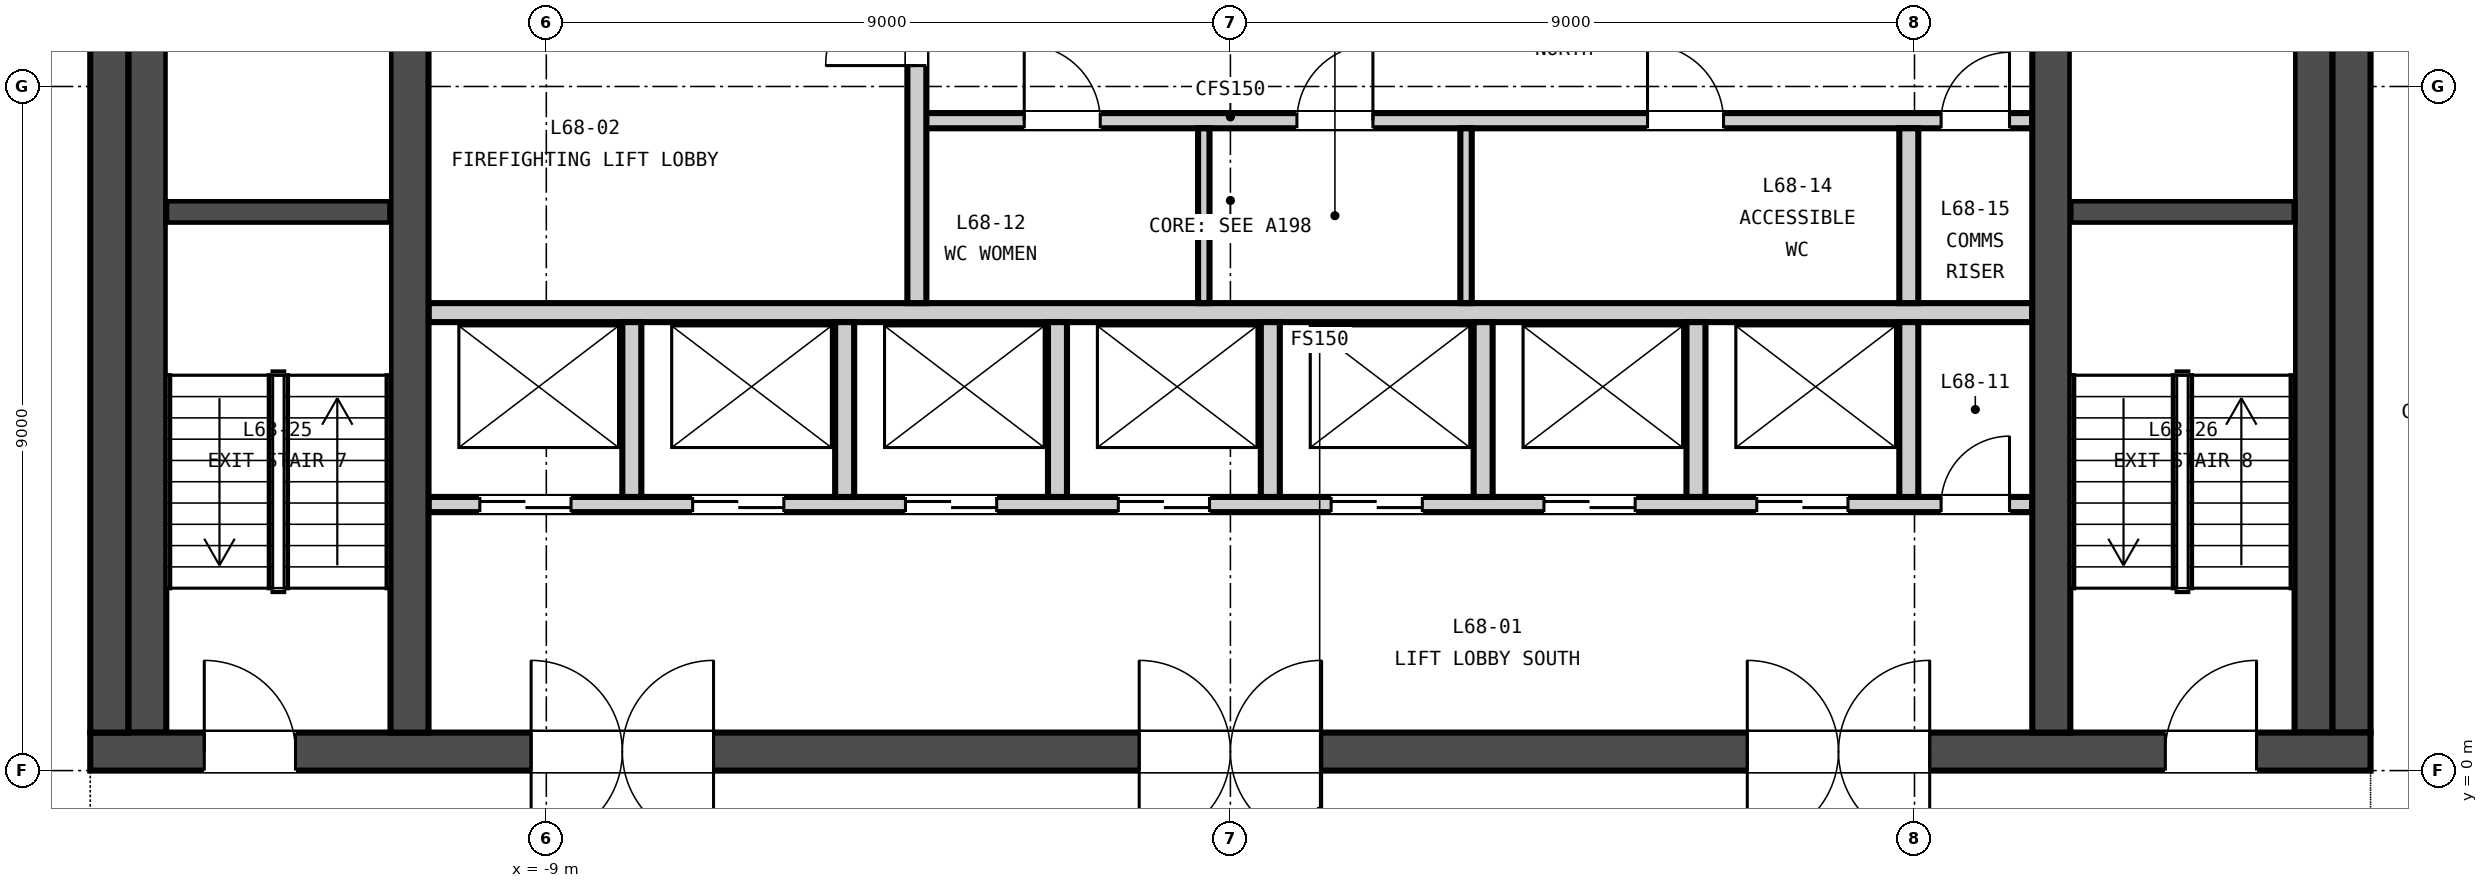
"""IFC4 building model, lengths in metres.
Left out: names, types, materials, properties, quantities, classifications, styles, units other than length and angle.
Written with IfcOpenShell. Run it as: python <this file> out.ifc"""

import sys

from ifc_helpers import new_model, si_unit, direction, frame, frame_2d, origin, place, context, subcontext, project, spatial, rectangle, extrude, element, fill, save


model = new_model("IFC4")
c1 = context("Model", 3, precision=1e-05, world=origin(), true_north=direction((0.0, 1.0)))
c2 = subcontext(c1, "Body", "Model", "MODEL_VIEW")
j1 = project(units=[si_unit("LENGTHUNIT", "METRE"), si_unit("PLANEANGLEUNIT", "RADIAN")], contexts=[c1])
p1 = place(None, origin())
s1 = spatial("IfcSite", under=j1, at=p1, CompositionType="ELEMENT")
p2 = place(p1, origin())
s2 = spatial("IfcBuilding", under=s1, at=p2, CompositionType="ELEMENT")
p3 = place(p2, frame((0.0, 0.0, 268.25)))
s3 = spatial("IfcBuildingStorey", under=s2, at=p3, CompositionType="ELEMENT", Elevation=268.25)
p4 = place(p3, frame((-15.0, 0.25, -0.15), z_axis=(0.0, 0.0, 1.0), x_axis=(1.0, 0.0, 0.0)))
e1 = element("IfcWall", 1, at=p4, inside=s3, PredefinedType="SOLIDWALL", context=c2, shape_type="SweptSolid", body=[
    extrude(rectangle(XDim=30.0, YDim=0.5, at=frame_2d((15.0, 0.0))), origin(), (0.0, 0.0, 1.0), 3.65),
])
p5 = place(p4, frame((5.8, 0.0, 0.15)))
e2 = element("IfcOpeningElement", 2, at=p5, cuts=e1, PredefinedType="OPENING", context=c2, shape_type="SweptSolid", body=[
    extrude(rectangle(XDim=2.4, YDim=2.4, at=frame_2d((1.2, 1.2))), frame((0.0, 0.26, 0.0), z_axis=(0.0, -1.0, 0.0), x_axis=(1.0, 0.0, 0.0)), (0.0, 0.0, 1.0), 0.52),
])
p6 = place(p4, frame((13.8, 0.0, 0.15)))
e3 = element("IfcOpeningElement", 3, at=p6, cuts=e1, PredefinedType="OPENING", context=c2, shape_type="SweptSolid", body=[
    extrude(rectangle(XDim=2.4, YDim=2.4, at=frame_2d((1.2, 1.2))), frame((0.0, 0.26, 0.0), z_axis=(0.0, -1.0, 0.0), x_axis=(1.0, 0.0, 0.0)), (0.0, 0.0, 1.0), 0.52),
])
p7 = place(p4, frame((21.8, 0.0, 0.15)))
e4 = element("IfcOpeningElement", 4, at=p7, cuts=e1, PredefinedType="OPENING", context=c2, shape_type="SweptSolid", body=[
    extrude(rectangle(XDim=2.4, YDim=2.4, at=frame_2d((1.2, 1.2))), frame((0.0, 0.26, 0.0), z_axis=(0.0, -1.0, 0.0), x_axis=(1.0, 0.0, 0.0)), (0.0, 0.0, 1.0), 0.52),
])
p8 = place(p4, frame((1.5, 0.0, 0.15)))
e5 = element("IfcOpeningElement", 5, at=p8, cuts=e1, PredefinedType="OPENING", context=c2, shape_type="SweptSolid", body=[
    extrude(rectangle(XDim=1.2, YDim=2.1, at=frame_2d((0.6, 1.05))), frame((0.0, 0.26, 0.0), z_axis=(0.0, -1.0, 0.0), x_axis=(1.0, 0.0, 0.0)), (0.0, 0.0, 1.0), 0.52),
])
p9 = place(p4, frame((27.3, 0.0, 0.15)))
e6 = element("IfcOpeningElement", 6, at=p9, cuts=e1, PredefinedType="OPENING", context=c2, shape_type="SweptSolid", body=[
    extrude(rectangle(XDim=1.2, YDim=2.1, at=frame_2d((0.6, 1.05))), frame((0.0, 0.26, 0.0), z_axis=(0.0, -1.0, 0.0), x_axis=(1.0, 0.0, 0.0)), (0.0, 0.0, 1.0), 0.52),
])
for number, where, z_axis, x_axis in (
    (7, (-14.75, 0.5, -0.15), (0.0, 0.0, 1.0), (0.0, 1.0, 0.0)),
    (8, (14.75, 0.5, -0.15), (0.0, 0.0, 1.0), (0.0, 1.0, 0.0)),
    (9, (-10.8, 0.5, -0.15), (0.0, 0.0, 1.0), (0.0, 1.0, 0.0)),
    (10, (10.8, 0.5, -0.15), (0.0, 0.0, 1.0), (0.0, 1.0, 0.0)),
):
    element("IfcWall", number, at=place(p3, frame(where, z_axis=z_axis, x_axis=x_axis)), inside=s3, PredefinedType="SOLIDWALL", context=c2, shape_type="SweptSolid", body=[
        extrude(rectangle(XDim=14.0, YDim=0.5, at=frame_2d((7.0, 0.0))), origin(), (0.0, 0.0, 1.0), 3.65),
    ])
p10 = place(p3, frame((-10.55, 3.5, 0.0), z_axis=(0.0, 0.0, 1.0), x_axis=(1.0, 0.0, 0.0)))
e11 = element("IfcWall", 11, at=p10, inside=s3, PredefinedType="PARTITIONING", context=c2, shape_type="SweptSolid", body=[
    extrude(rectangle(XDim=21.1, YDim=0.2, at=frame_2d((10.55, 0.0))), origin(), (0.0, 0.0, 1.0), 3.5),
])
p11 = place(p10, frame((0.675, 0.0, 0.0)))
e12 = element("IfcOpeningElement", 12, at=p11, cuts=e11, PredefinedType="OPENING", context=c2, shape_type="SweptSolid", body=[
    extrude(rectangle(XDim=1.2, YDim=2.1, at=frame_2d((0.6, 1.05))), frame((0.0, 0.11, 0.0), z_axis=(0.0, -1.0, 0.0), x_axis=(1.0, 0.0, 0.0)), (0.0, 0.0, 1.0), 0.22),
])
p12 = place(p10, frame((3.475, 0.0, 0.0)))
e13 = element("IfcOpeningElement", 13, at=p12, cuts=e11, PredefinedType="OPENING", context=c2, shape_type="SweptSolid", body=[
    extrude(rectangle(XDim=1.2, YDim=2.1, at=frame_2d((0.6, 1.05))), frame((0.0, 0.11, 0.0), z_axis=(0.0, -1.0, 0.0), x_axis=(1.0, 0.0, 0.0)), (0.0, 0.0, 1.0), 0.22),
])
p13 = place(p10, frame((6.275, 0.0, 0.0)))
e14 = element("IfcOpeningElement", 14, at=p13, cuts=e11, PredefinedType="OPENING", context=c2, shape_type="SweptSolid", body=[
    extrude(rectangle(XDim=1.2, YDim=2.1, at=frame_2d((0.6, 1.05))), frame((0.0, 0.11, 0.0), z_axis=(0.0, -1.0, 0.0), x_axis=(1.0, 0.0, 0.0)), (0.0, 0.0, 1.0), 0.22),
])
p14 = place(p10, frame((9.075, 0.0, 0.0)))
e15 = element("IfcOpeningElement", 15, at=p14, cuts=e11, PredefinedType="OPENING", context=c2, shape_type="SweptSolid", body=[
    extrude(rectangle(XDim=1.2, YDim=2.1, at=frame_2d((0.6, 1.05))), frame((0.0, 0.11, 0.0), z_axis=(0.0, -1.0, 0.0), x_axis=(1.0, 0.0, 0.0)), (0.0, 0.0, 1.0), 0.22),
])
p15 = place(p10, frame((11.875, 0.0, 0.0)))
e16 = element("IfcOpeningElement", 16, at=p15, cuts=e11, PredefinedType="OPENING", context=c2, shape_type="SweptSolid", body=[
    extrude(rectangle(XDim=1.2, YDim=2.1, at=frame_2d((0.6, 1.05))), frame((0.0, 0.11, 0.0), z_axis=(0.0, -1.0, 0.0), x_axis=(1.0, 0.0, 0.0)), (0.0, 0.0, 1.0), 0.22),
])
p16 = place(p10, frame((14.675, 0.0, 0.0)))
e17 = element("IfcOpeningElement", 17, at=p16, cuts=e11, PredefinedType="OPENING", context=c2, shape_type="SweptSolid", body=[
    extrude(rectangle(XDim=1.2, YDim=2.1, at=frame_2d((0.6, 1.05))), frame((0.0, 0.11, 0.0), z_axis=(0.0, -1.0, 0.0), x_axis=(1.0, 0.0, 0.0)), (0.0, 0.0, 1.0), 0.22),
])
p17 = place(p10, frame((17.475, 0.0, 0.0)))
e18 = element("IfcOpeningElement", 18, at=p17, cuts=e11, PredefinedType="OPENING", context=c2, shape_type="SweptSolid", body=[
    extrude(rectangle(XDim=1.2, YDim=2.1, at=frame_2d((0.6, 1.05))), frame((0.0, 0.11, 0.0), z_axis=(0.0, -1.0, 0.0), x_axis=(1.0, 0.0, 0.0)), (0.0, 0.0, 1.0), 0.22),
])
p18 = place(p10, frame((19.9, 0.0, 0.0)))
e19 = element("IfcOpeningElement", 19, at=p18, cuts=e11, PredefinedType="OPENING", context=c2, shape_type="SweptSolid", body=[
    extrude(rectangle(XDim=0.9, YDim=2.1, at=frame_2d((0.45, 1.05))), frame((0.0, 0.11, 0.0), z_axis=(0.0, -1.0, 0.0), x_axis=(1.0, 0.0, 0.0)), (0.0, 0.0, 1.0), 0.22),
])
p19 = place(p3, frame((-10.55, 6.025, 0.0), z_axis=(0.0, 0.0, 1.0), x_axis=(1.0, 0.0, 0.0)))
e20 = element("IfcWall", 20, at=p19, inside=s3, PredefinedType="PARTITIONING", context=c2, shape_type="SweptSolid", body=[
    extrude(rectangle(XDim=21.1, YDim=0.25, at=frame_2d((10.55, 0.0))), origin(), (0.0, 0.0, 1.0), 3.5),
])
p20 = place(p3, frame((-4.125, 8.55, 0.0), z_axis=(0.0, 0.0, 1.0), x_axis=(1.0, 0.0, 0.0)))
e21 = element("IfcWall", 21, at=p20, inside=s3, PredefinedType="PARTITIONING", context=c2, shape_type="SweptSolid", body=[
    extrude(rectangle(XDim=14.675, YDim=0.2, at=frame_2d((7.337, 0.0))), origin(), (0.0, 0.0, 1.0), 3.5),
])
p21 = place(p20, frame((1.413, 0.0, 0.0)))
e22 = element("IfcOpeningElement", 22, at=p21, cuts=e21, PredefinedType="OPENING", context=c2, shape_type="SweptSolid", body=[
    extrude(rectangle(XDim=1.0, YDim=2.1, at=frame_2d((0.5, 1.05))), frame((0.0, 0.11, 0.0), z_axis=(0.0, -1.0, 0.0), x_axis=(1.0, 0.0, 0.0)), (0.0, 0.0, 1.0), 0.22),
])
p22 = place(p20, frame((5.0, 0.0, 0.0)))
e23 = element("IfcOpeningElement", 23, at=p22, cuts=e21, PredefinedType="OPENING", context=c2, shape_type="SweptSolid", body=[
    extrude(rectangle(XDim=1.0, YDim=2.1, at=frame_2d((0.5, 1.05))), frame((0.0, 0.11, 0.0), z_axis=(0.0, -1.0, 0.0), x_axis=(1.0, 0.0, 0.0)), (0.0, 0.0, 1.0), 0.22),
])
p23 = place(p20, frame((9.613, 0.0, 0.0)))
e24 = element("IfcOpeningElement", 24, at=p23, cuts=e21, PredefinedType="OPENING", context=c2, shape_type="SweptSolid", body=[
    extrude(rectangle(XDim=1.0, YDim=2.1, at=frame_2d((0.5, 1.05))), frame((0.0, 0.11, 0.0), z_axis=(0.0, -1.0, 0.0), x_axis=(1.0, 0.0, 0.0)), (0.0, 0.0, 1.0), 0.22),
])
p24 = place(p20, frame((13.475, 0.0, 0.0)))
e25 = element("IfcOpeningElement", 25, at=p24, cuts=e21, PredefinedType="OPENING", context=c2, shape_type="SweptSolid", body=[
    extrude(rectangle(XDim=0.9, YDim=2.1, at=frame_2d((0.45, 1.05))), frame((0.0, 0.11, 0.0), z_axis=(0.0, -1.0, 0.0), x_axis=(1.0, 0.0, 0.0)), (0.0, 0.0, 1.0), 0.22),
])
p25 = place(p3, frame((-4.125, 6.15, 0.0), z_axis=(0.0, 0.0, 1.0), x_axis=(0.0, 1.0, 0.0)))
e26 = element("IfcWall", 26, at=p25, inside=s3, PredefinedType="PARTITIONING", context=c2, shape_type="SweptSolid", body=[
    extrude(rectangle(XDim=4.95, YDim=0.25, at=frame_2d((2.475, 0.0))), origin(), (0.0, 0.0, 1.0), 3.5),
])
p26 = place(p25, frame((3.125, 0.0, 0.0)))
e27 = element("IfcOpeningElement", 27, at=p26, cuts=e26, PredefinedType="OPENING", context=c2, shape_type="SweptSolid", body=[
    extrude(rectangle(XDim=1.2, YDim=2.1, at=frame_2d((0.6, 1.05))), frame((0.0, 0.135, 0.0), z_axis=(0.0, -1.0, 0.0), x_axis=(1.0, 0.0, 0.0)), (0.0, 0.0, 1.0), 0.27),
])
for number, where, z_axis, x_axis in (
    (28, (-7.875, 3.6, 0.0), (0.0, 0.0, 1.0), (0.0, 1.0, 0.0)),
    (29, (-5.075, 3.6, 0.0), (0.0, 0.0, 1.0), (0.0, 1.0, 0.0)),
    (30, (-2.275, 3.6, 0.0), (0.0, 0.0, 1.0), (0.0, 1.0, 0.0)),
    (31, (0.525, 3.6, 0.0), (0.0, 0.0, 1.0), (0.0, 1.0, 0.0)),
    (32, (3.325, 3.6, 0.0), (0.0, 0.0, 1.0), (0.0, 1.0, 0.0)),
    (33, (6.125, 3.6, 0.0), (0.0, 0.0, 1.0), (0.0, 1.0, 0.0)),
    (34, (8.925, 3.6, 0.0), (0.0, 0.0, 1.0), (0.0, 1.0, 0.0)),
):
    element("IfcWall", number, at=place(p3, frame(where, z_axis=z_axis, x_axis=x_axis)), inside=s3, PredefinedType="PARTITIONING", context=c2, shape_type="SweptSolid", body=[
        extrude(rectangle(XDim=2.3, YDim=0.25, at=frame_2d((1.15, 0.0))), origin(), (0.0, 0.0, 1.0), 3.5),
    ])
for number, where, z_axis, x_axis in (
    (35, (-0.35, 6.15, 0.0), (0.0, 0.0, 1.0), (0.0, 1.0, 0.0)),
    (36, (3.1, 6.15, 0.0), (0.0, 0.0, 1.0), (0.0, 1.0, 0.0)),
):
    element("IfcWall", number, at=place(p3, frame(where, z_axis=z_axis, x_axis=x_axis)), inside=s3, PredefinedType="PARTITIONING", context=c2, shape_type="SweptSolid", body=[
        extrude(rectangle(XDim=2.3, YDim=0.15, at=frame_2d((1.15, 0.0))), origin(), (0.0, 0.0, 1.0), 3.5),
    ])
p27 = place(p3, frame((8.925, 6.15, 0.0), z_axis=(0.0, 0.0, 1.0), x_axis=(0.0, 1.0, 0.0)))
e37 = element("IfcWall", 37, at=p27, inside=s3, PredefinedType="PARTITIONING", context=c2, shape_type="SweptSolid", body=[
    extrude(rectangle(XDim=2.3, YDim=0.25, at=frame_2d((1.15, 0.0))), origin(), (0.0, 0.0, 1.0), 3.5),
])
p28 = place(p3, frame((-14.0, 7.35, 0.0), z_axis=(0.0, 0.0, 1.0), x_axis=(1.0, 0.0, 0.0)))
e38 = element("IfcWall", 38, at=p28, inside=s3, PredefinedType="SOLIDWALL", context=c2, shape_type="SweptSolid", body=[
    extrude(rectangle(XDim=2.95, YDim=0.3, at=frame_2d((1.475, 0.0))), origin(), (0.0, 0.0, 1.0), 3.5),
])
p29 = place(p3, frame((-14.25, 0.5, 0.0), z_axis=(0.0, 0.0, 1.0), x_axis=(0.0, 1.0, 0.0)))
e39 = element("IfcWall", 39, at=p29, inside=s3, PredefinedType="SOLIDWALL", context=c2, shape_type="SweptSolid", body=[
    extrude(rectangle(XDim=14.0, YDim=0.5, at=frame_2d((7.0, 0.0))), origin(), (0.0, 0.0, 1.0), 3.5),
])
p30 = place(p3, frame((11.05, 7.35, 0.0), z_axis=(0.0, 0.0, 1.0), x_axis=(1.0, 0.0, 0.0)))
e40 = element("IfcWall", 40, at=p30, inside=s3, PredefinedType="SOLIDWALL", context=c2, shape_type="SweptSolid", body=[
    extrude(rectangle(XDim=2.95, YDim=0.3, at=frame_2d((1.475, 0.0))), origin(), (0.0, 0.0, 1.0), 3.5),
])
p31 = place(p3, frame((14.25, 0.5, 0.0), z_axis=(0.0, 0.0, 1.0), x_axis=(0.0, 1.0, 0.0)))
e41 = element("IfcWall", 41, at=p31, inside=s3, PredefinedType="SOLIDWALL", context=c2, shape_type="SweptSolid", body=[
    extrude(rectangle(XDim=14.0, YDim=0.5, at=frame_2d((7.0, 0.0))), origin(), (0.0, 0.0, 1.0), 3.5),
])
p32 = place(p26, origin())
e42 = element("IfcDoor", 42, at=p32, inside=s3, OperationType="SINGLE_SWING_LEFT", PredefinedType="DOOR", context=c2, shape_type="SweptSolid", body=[
    extrude(rectangle(XDim=1.2, YDim=2.1, at=frame_2d((0.6, 1.05))), frame((0.0, 0.025, 0.0), z_axis=(0.0, -1.0, 0.0), x_axis=(1.0, 0.0, 0.0)), (0.0, 0.0, 1.0), 0.05),
])
fill(e27, e42)
p33 = place(p11, origin())
e43 = element("IfcDoor", 43, at=p33, inside=s3, OperationType="DOUBLE_DOOR_SLIDING", PredefinedType="DOOR", context=c2, shape_type="SweptSolid", body=[
    extrude(rectangle(XDim=1.2, YDim=2.1, at=frame_2d((0.6, 1.05))), frame((0.0, 0.025, 0.0), z_axis=(0.0, -1.0, 0.0), x_axis=(1.0, 0.0, 0.0)), (0.0, 0.0, 1.0), 0.05),
])
fill(e12, e43)
p34 = place(p12, origin())
e44 = element("IfcDoor", 44, at=p34, inside=s3, OperationType="DOUBLE_DOOR_SLIDING", PredefinedType="DOOR", context=c2, shape_type="SweptSolid", body=[
    extrude(rectangle(XDim=1.2, YDim=2.1, at=frame_2d((0.6, 1.05))), frame((0.0, 0.025, 0.0), z_axis=(0.0, -1.0, 0.0), x_axis=(1.0, 0.0, 0.0)), (0.0, 0.0, 1.0), 0.05),
])
fill(e13, e44)
p35 = place(p13, origin())
e45 = element("IfcDoor", 45, at=p35, inside=s3, OperationType="DOUBLE_DOOR_SLIDING", PredefinedType="DOOR", context=c2, shape_type="SweptSolid", body=[
    extrude(rectangle(XDim=1.2, YDim=2.1, at=frame_2d((0.6, 1.05))), frame((0.0, 0.025, 0.0), z_axis=(0.0, -1.0, 0.0), x_axis=(1.0, 0.0, 0.0)), (0.0, 0.0, 1.0), 0.05),
])
fill(e14, e45)
p36 = place(p14, origin())
e46 = element("IfcDoor", 46, at=p36, inside=s3, OperationType="DOUBLE_DOOR_SLIDING", PredefinedType="DOOR", context=c2, shape_type="SweptSolid", body=[
    extrude(rectangle(XDim=1.2, YDim=2.1, at=frame_2d((0.6, 1.05))), frame((0.0, 0.025, 0.0), z_axis=(0.0, -1.0, 0.0), x_axis=(1.0, 0.0, 0.0)), (0.0, 0.0, 1.0), 0.05),
])
fill(e15, e46)
p37 = place(p15, origin())
e47 = element("IfcDoor", 47, at=p37, inside=s3, OperationType="DOUBLE_DOOR_SLIDING", PredefinedType="DOOR", context=c2, shape_type="SweptSolid", body=[
    extrude(rectangle(XDim=1.2, YDim=2.1, at=frame_2d((0.6, 1.05))), frame((0.0, 0.025, 0.0), z_axis=(0.0, -1.0, 0.0), x_axis=(1.0, 0.0, 0.0)), (0.0, 0.0, 1.0), 0.05),
])
fill(e16, e47)
p38 = place(p16, origin())
e48 = element("IfcDoor", 48, at=p38, inside=s3, OperationType="DOUBLE_DOOR_SLIDING", PredefinedType="DOOR", context=c2, shape_type="SweptSolid", body=[
    extrude(rectangle(XDim=1.2, YDim=2.1, at=frame_2d((0.6, 1.05))), frame((0.0, 0.025, 0.0), z_axis=(0.0, -1.0, 0.0), x_axis=(1.0, 0.0, 0.0)), (0.0, 0.0, 1.0), 0.05),
])
fill(e17, e48)
p39 = place(p17, origin())
e49 = element("IfcDoor", 49, at=p39, inside=s3, OperationType="DOUBLE_DOOR_SLIDING", PredefinedType="DOOR", context=c2, shape_type="SweptSolid", body=[
    extrude(rectangle(XDim=1.2, YDim=2.1, at=frame_2d((0.6, 1.05))), frame((0.0, 0.025, 0.0), z_axis=(0.0, -1.0, 0.0), x_axis=(1.0, 0.0, 0.0)), (0.0, 0.0, 1.0), 0.05),
])
fill(e18, e49)
p40 = place(p18, origin())
e50 = element("IfcDoor", 50, at=p40, inside=s3, OperationType="SINGLE_SWING_RIGHT", PredefinedType="DOOR", context=c2, shape_type="SweptSolid", body=[
    extrude(rectangle(XDim=0.9, YDim=2.1, at=frame_2d((0.45, 1.05))), frame((0.0, 0.025, 0.0), z_axis=(0.0, -1.0, 0.0), x_axis=(1.0, 0.0, 0.0)), (0.0, 0.0, 1.0), 0.05),
])
fill(e19, e50)
p41 = place(p21, origin())
e51 = element("IfcDoor", 51, at=p41, inside=s3, OperationType="SINGLE_SWING_LEFT", PredefinedType="DOOR", context=c2, shape_type="SweptSolid", body=[
    extrude(rectangle(XDim=1.0, YDim=2.1, at=frame_2d((0.5, 1.05))), frame((0.0, 0.025, 0.0), z_axis=(0.0, -1.0, 0.0), x_axis=(1.0, 0.0, 0.0)), (0.0, 0.0, 1.0), 0.05),
])
fill(e22, e51)
p42 = place(p22, origin())
e52 = element("IfcDoor", 52, at=p42, inside=s3, OperationType="SINGLE_SWING_RIGHT", PredefinedType="DOOR", context=c2, shape_type="SweptSolid", body=[
    extrude(rectangle(XDim=1.0, YDim=2.1, at=frame_2d((0.5, 1.05))), frame((0.0, 0.025, 0.0), z_axis=(0.0, -1.0, 0.0), x_axis=(1.0, 0.0, 0.0)), (0.0, 0.0, 1.0), 0.05),
])
fill(e23, e52)
p43 = place(p23, origin())
e53 = element("IfcDoor", 53, at=p43, inside=s3, OperationType="SINGLE_SWING_LEFT", PredefinedType="DOOR", context=c2, shape_type="SweptSolid", body=[
    extrude(rectangle(XDim=1.0, YDim=2.1, at=frame_2d((0.5, 1.05))), frame((0.0, 0.025, 0.0), z_axis=(0.0, -1.0, 0.0), x_axis=(1.0, 0.0, 0.0)), (0.0, 0.0, 1.0), 0.05),
])
fill(e24, e53)
p44 = place(p24, origin())
e54 = element("IfcDoor", 54, at=p44, inside=s3, OperationType="SINGLE_SWING_RIGHT", PredefinedType="DOOR", context=c2, shape_type="SweptSolid", body=[
    extrude(rectangle(XDim=0.9, YDim=2.1, at=frame_2d((0.45, 1.05))), frame((0.0, 0.025, 0.0), z_axis=(0.0, -1.0, 0.0), x_axis=(1.0, 0.0, 0.0)), (0.0, 0.0, 1.0), 0.05),
])
fill(e25, e54)
p45 = place(p5, origin())
e55 = element("IfcDoor", 55, at=p45, inside=s3, OperationType="DOUBLE_DOOR_DOUBLE_SWING", PredefinedType="DOOR", context=c2, shape_type="SweptSolid", body=[
    extrude(rectangle(XDim=2.4, YDim=2.4, at=frame_2d((1.2, 1.2))), frame((0.0, 0.025, 0.0), z_axis=(0.0, -1.0, 0.0), x_axis=(1.0, 0.0, 0.0)), (0.0, 0.0, 1.0), 0.05),
])
fill(e2, e55)
p46 = place(p6, origin())
e56 = element("IfcDoor", 56, at=p46, inside=s3, OperationType="DOUBLE_DOOR_DOUBLE_SWING", PredefinedType="DOOR", context=c2, shape_type="SweptSolid", body=[
    extrude(rectangle(XDim=2.4, YDim=2.4, at=frame_2d((1.2, 1.2))), frame((0.0, 0.025, 0.0), z_axis=(0.0, -1.0, 0.0), x_axis=(1.0, 0.0, 0.0)), (0.0, 0.0, 1.0), 0.05),
])
fill(e3, e56)
p47 = place(p7, origin())
e57 = element("IfcDoor", 57, at=p47, inside=s3, OperationType="DOUBLE_DOOR_DOUBLE_SWING", PredefinedType="DOOR", context=c2, shape_type="SweptSolid", body=[
    extrude(rectangle(XDim=2.4, YDim=2.4, at=frame_2d((1.2, 1.2))), frame((0.0, 0.025, 0.0), z_axis=(0.0, -1.0, 0.0), x_axis=(1.0, 0.0, 0.0)), (0.0, 0.0, 1.0), 0.05),
])
fill(e4, e57)
p48 = place(p8, origin())
e58 = element("IfcDoor", 58, at=p48, inside=s3, OperationType="SINGLE_SWING_LEFT", PredefinedType="DOOR", context=c2, shape_type="SweptSolid", body=[
    extrude(rectangle(XDim=1.2, YDim=2.1, at=frame_2d((0.6, 1.05))), frame((0.0, 0.025, 0.0), z_axis=(0.0, -1.0, 0.0), x_axis=(1.0, 0.0, 0.0)), (0.0, 0.0, 1.0), 0.05),
])
fill(e5, e58)
p49 = place(p9, origin())
e59 = element("IfcDoor", 59, at=p49, inside=s3, OperationType="SINGLE_SWING_RIGHT", PredefinedType="DOOR", context=c2, shape_type="SweptSolid", body=[
    extrude(rectangle(XDim=1.2, YDim=2.1, at=frame_2d((0.6, 1.05))), frame((0.0, 0.025, 0.0), z_axis=(0.0, -1.0, 0.0), x_axis=(1.0, 0.0, 0.0)), (0.0, 0.0, 1.0), 0.05),
])
fill(e6, e59)
save(model, sys.argv[1])
